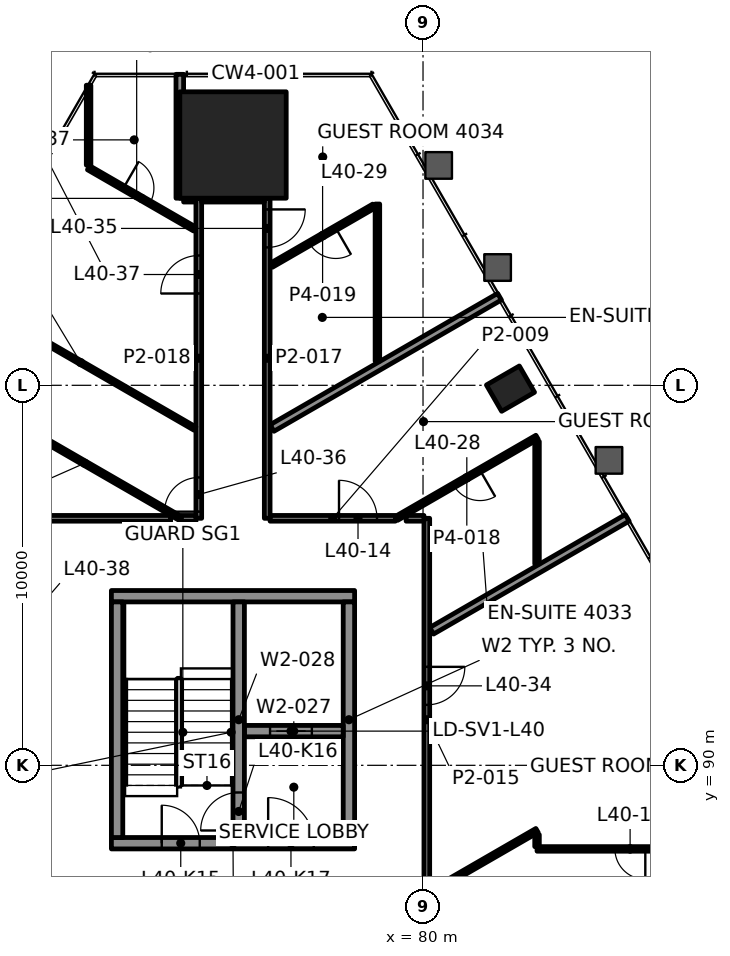
"""IFC4 building model, lengths in metres.
Left out: names, types, materials, properties, quantities, classifications, styles, units other than length and angle.
Written with IfcOpenShell. Run it as: python <this file> out.ifc"""

import sys

from ifc_helpers import new_model, si_unit, direction, frame, frame_2d, origin, origin_2d, place, context, subcontext, project, spatial, rectangle, hollow_rectangle, extrude, element, fill, save


model = new_model("IFC4")
c1 = context("Model", 3, precision=1e-05, world=origin(), true_north=direction((0.0, 1.0)))
c2 = subcontext(c1, "Body", "Model", "MODEL_VIEW")
j1 = project(units=[si_unit("LENGTHUNIT", "METRE"), si_unit("PLANEANGLEUNIT", "RADIAN")], contexts=[c1])
p1 = place(None, origin())
s1 = spatial("IfcSite", under=j1, at=p1, CompositionType="ELEMENT")
p2 = place(p1, origin())
s2 = spatial("IfcBuilding", under=s1, at=p2, CompositionType="ELEMENT")
p3 = place(p2, frame((0.0, 0.0, 175.3)))
s3 = spatial("IfcBuildingStorey", under=s2, at=p3, CompositionType="ELEMENT", Elevation=175.3)
p4 = place(p3, frame((75.0, 106.323, 0.0), z_axis=(0.0, 0.0, 1.0), x_axis=(-1.0, 0.0, 0.0)))
e1 = element("IfcColumn", 1, at=p4, inside=s3, PredefinedType="COLUMN", context=c2, shape_type="SweptSolid", body=[
    extrude(rectangle(XDim=2.8, YDim=2.8, at=origin_2d()), origin(), (0.0, 0.0, 1.0), 3.9),
])
p5 = place(p3, frame((82.302, 99.912, -0.0), z_axis=(0.0, 0.0, 1.0), x_axis=(-0.5, 0.866025403784, 0.0)))
e2 = element("IfcColumn", 2, at=p5, inside=s3, PredefinedType="COLUMN", context=c2, shape_type="SweptSolid", body=[
    extrude(hollow_rectangle(XDim=0.8, YDim=1.0, WallThickness=0.05, at=origin_2d()), origin(), (0.0, 0.0, 1.0), 3.9),
])
p6 = place(p3, frame((71.8, 87.95, 0.0), z_axis=(0.0, 0.0, 1.0), x_axis=(1.0, 0.0, 0.0)))
e3 = element("IfcWall", 3, at=p6, inside=s3, PredefinedType="SHEAR", context=c2, shape_type="SweptSolid", body=[
    extrude(rectangle(XDim=6.4, YDim=0.3, at=frame_2d((3.2, 0.0))), origin(), (0.0, 0.0, 1.0), 3.7),
])
p7 = place(p6, frame((1.325, 0.0, 0.0)))
e4 = element("IfcOpeningElement", 4, at=p7, cuts=e3, PredefinedType="OPENING", context=c2, shape_type="SweptSolid", body=[
    extrude(rectangle(XDim=1.0, YDim=2.1, at=frame_2d((0.5, 1.05))), frame((0.0, 0.16, 0.0), z_axis=(0.0, -1.0, 0.0), x_axis=(1.0, 0.0, 0.0)), (0.0, 0.0, 1.0), 0.32),
])
p8 = place(p6, frame((4.125, 0.0, 0.0)))
e5 = element("IfcOpeningElement", 5, at=p8, cuts=e3, PredefinedType="OPENING", context=c2, shape_type="SweptSolid", body=[
    extrude(rectangle(XDim=1.2, YDim=2.1, at=frame_2d((0.6, 1.05))), frame((0.0, 0.16, 0.0), z_axis=(0.0, -1.0, 0.0), x_axis=(1.0, 0.0, 0.0)), (0.0, 0.0, 1.0), 0.32),
])
p9 = place(p3, frame((71.8, 94.45, 0.0), z_axis=(0.0, 0.0, 1.0), x_axis=(1.0, 0.0, 0.0)))
e6 = element("IfcWall", 6, at=p9, inside=s3, PredefinedType="SHEAR", context=c2, shape_type="SweptSolid", body=[
    extrude(rectangle(XDim=6.4, YDim=0.3, at=frame_2d((3.2, 0.0))), origin(), (0.0, 0.0, 1.0), 3.7),
])
for number, where, z_axis, x_axis in (
    (7, (71.95, 88.1, 0.0), (0.0, 0.0, 1.0), (0.0, 1.0, 0.0)),
    (8, (78.05, 88.1, 0.0), (0.0, 0.0, 1.0), (0.0, 1.0, 0.0)),
):
    element("IfcWall", number, at=place(p3, frame(where, z_axis=z_axis, x_axis=x_axis)), inside=s3, PredefinedType="SHEAR", context=c2, shape_type="SweptSolid", body=[
        extrude(rectangle(XDim=6.2, YDim=0.3, at=frame_2d((3.1, 0.0))), origin(), (0.0, 0.0, 1.0), 3.7),
    ])
p10 = place(p3, frame((75.3, 90.9, 0.0), z_axis=(0.0, 0.0, 1.0), x_axis=(1.0, 0.0, 0.0)))
e9 = element("IfcWall", 9, at=p10, inside=s3, PredefinedType="SHEAR", context=c2, shape_type="SweptSolid", body=[
    extrude(rectangle(XDim=2.6, YDim=0.3, at=frame_2d((1.3, 0.0))), origin(), (0.0, 0.0, 1.0), 3.7),
])
p11 = place(p10, frame((0.675, 0.0, 0.0)))
e10 = element("IfcOpeningElement", 10, at=p11, cuts=e9, PredefinedType="OPENING", context=c2, shape_type="SweptSolid", body=[
    extrude(rectangle(XDim=1.1, YDim=2.1, at=frame_2d((0.55, 1.05))), frame((0.0, 0.16, 0.0), z_axis=(0.0, -1.0, 0.0), x_axis=(1.0, 0.0, 0.0)), (0.0, 0.0, 1.0), 0.32),
])
p12 = place(p3, frame((75.15, 88.1, 0.0), z_axis=(0.0, 0.0, 1.0), x_axis=(0.0, 1.0, 0.0)))
e11 = element("IfcWall", 11, at=p12, inside=s3, PredefinedType="SHEAR", context=c2, shape_type="SweptSolid", body=[
    extrude(rectangle(XDim=6.2, YDim=0.3, at=frame_2d((3.1, 0.0))), origin(), (0.0, 0.0, 1.0), 3.7),
])
p13 = place(p12, frame((0.185, 0.0, 0.0)))
e12 = element("IfcOpeningElement", 12, at=p13, cuts=e11, PredefinedType="OPENING", context=c2, shape_type="SweptSolid", body=[
    extrude(rectangle(XDim=1.0, YDim=2.1, at=frame_2d((0.5, 1.05))), frame((0.0, 0.16, 0.0), z_axis=(0.0, -1.0, 0.0), x_axis=(1.0, 0.0, 0.0)), (0.0, 0.0, 1.0), 0.32),
])
p14 = place(p3, frame((87.898, 87.8, 0.0), z_axis=(0.0, 0.0, 1.0), x_axis=(-1.0, 0.0, 0.0)))
e13 = element("IfcWall", 13, at=p14, inside=s3, PredefinedType="PARTITIONING", context=c2, shape_type="SweptSolid", body=[
    extrude(rectangle(XDim=4.898, YDim=0.12, at=frame_2d((2.449, 0.0))), origin(), (0.0, 0.0, 1.0), 3.1),
])
p15 = place(p14, frame((2.049, 0.0, 0.0)))
e14 = element("IfcOpeningElement", 14, at=p15, cuts=e13, PredefinedType="OPENING", context=c2, shape_type="SweptSolid", body=[
    extrude(rectangle(XDim=0.8, YDim=2.1, at=frame_2d((0.4, 1.05))), frame((0.0, 0.07, 0.0), z_axis=(0.0, -1.0, 0.0), x_axis=(1.0, 0.0, 0.0)), (0.0, 0.0, 1.0), 0.14),
])
p16 = place(p3, frame((69.975, 96.5, 0.0), z_axis=(0.0, 0.0, 1.0), x_axis=(1.0, 0.0, 0.0)))
e15 = element("IfcWall", 15, at=p16, inside=s3, PredefinedType="PARTITIONING", context=c2, shape_type="SweptSolid", body=[
    extrude(rectangle(XDim=3.384, YDim=0.15, at=frame_2d((1.692, 0.0))), origin(), (0.0, 0.0, 1.0), 3.1),
])
p17 = place(p3, frame((75.975, 96.5, 0.0), z_axis=(0.0, 0.0, 1.0), x_axis=(1.0, 0.0, 0.0)))
e16 = element("IfcWall", 16, at=p17, inside=s3, PredefinedType="PARTITIONING", context=c2, shape_type="SweptSolid", body=[
    extrude(rectangle(XDim=3.299, YDim=0.15, at=frame_2d((1.649, 0.0))), origin(), (0.0, 0.0, 1.0), 3.1),
])
p18 = place(p17, frame((1.814, 0.0, 0.0)))
e17 = element("IfcOpeningElement", 17, at=p18, cuts=e16, PredefinedType="OPENING", context=c2, shape_type="SweptSolid", body=[
    extrude(rectangle(XDim=1.0, YDim=2.1, at=frame_2d((0.5, 1.05))), frame((0.0, 0.085, 0.0), z_axis=(0.0, -1.0, 0.0), x_axis=(1.0, 0.0, 0.0)), (0.0, 0.0, 1.0), 0.17),
])
p19 = place(p3, frame((73.7, 104.923, 0.0), z_axis=(0.0, 0.0, 1.0), x_axis=(1.0, 0.0, 0.0)))
e18 = element("IfcWall", 18, at=p19, inside=s3, PredefinedType="PARTITIONING", context=c2, shape_type="SweptSolid", body=[
    extrude(rectangle(XDim=0.324, YDim=0.2, at=frame_2d((0.162, 0.0))), origin(), (0.0, 0.0, 1.0), 3.1),
])
p20 = place(p3, frame((83.471, 85.065, 0.0), z_axis=(0.0, 0.0, 1.0), x_axis=(0.866022862013, 0.500004402451, 0.0)))
e19 = element("IfcWall", 19, at=p20, inside=s3, PredefinedType="PARTITIONING", context=c2, shape_type="SweptSolid", body=[
    extrude(rectangle(XDim=7.371, YDim=0.2, at=frame_2d((3.685, 0.0))), origin(), (0.0, 0.0, 1.0), 3.022),
])
p21 = place(p3, frame((80.209, 86.675, 0.0), z_axis=(0.0, 0.0, 1.0), x_axis=(0.86604299788, 0.499969524894, 0.0)))
e20 = element("IfcWall", 20, at=p21, inside=s3, PredefinedType="PARTITIONING", context=c2, shape_type="SweptSolid", body=[
    extrude(rectangle(XDim=3.222, YDim=0.12, at=frame_2d((1.611, 0.0))), origin(), (0.0, 0.0, 1.0), 3.1),
])
p22 = place(p3, frame((80.227, 93.541, 0.0), z_axis=(0.0, 0.0, 1.0), x_axis=(0.86603507536, 0.499983247966, 0.0)))
e21 = element("IfcWall", 21, at=p22, inside=s3, PredefinedType="PARTITIONING", context=c2, shape_type="SweptSolid", body=[
    extrude(rectangle(XDim=5.943, YDim=0.2, at=frame_2d((2.971, 0.0))), origin(), (0.0, 0.0, 1.0), 3.022),
])
p23 = place(p3, frame((83.0, 98.634, 0.0), z_axis=(0.0, 0.0, 1.0), x_axis=(-0.866013160285, -0.500021205763, 0.0)))
e22 = element("IfcWall", 22, at=p23, inside=s3, PredefinedType="PARTITIONING", context=c2, shape_type="SweptSolid", body=[
    extrude(rectangle(XDim=4.268, YDim=0.12, at=frame_2d((2.134, 0.0))), origin(), (0.0, 0.0, 1.0), 3.022),
])
p24 = place(p23, frame((1.734, 0.0, 0.0)))
e23 = element("IfcOpeningElement", 23, at=p24, cuts=e22, PredefinedType="OPENING", context=c2, shape_type="SweptSolid", body=[
    extrude(rectangle(XDim=0.8, YDim=2.1, at=frame_2d((0.4, 1.05))), frame((0.0, 0.07, 0.0), z_axis=(0.0, -1.0, 0.0), x_axis=(1.0, 0.0, 0.0)), (0.0, 0.0, 1.0), 0.14),
])
p25 = place(p3, frame((76.027, 98.876, 0.0), z_axis=(0.0, 0.0, 1.0), x_axis=(0.866023821458, 0.500002740659, 0.0)))
e24 = element("IfcWall", 24, at=p25, inside=s3, PredefinedType="PARTITIONING", context=c2, shape_type="SweptSolid", body=[
    extrude(rectangle(XDim=6.912, YDim=0.2, at=frame_2d((3.456, 0.0))), origin(), (0.0, 0.0, 1.0), 3.1),
])
p26 = place(p3, frame((78.705, 104.716, 0.0), z_axis=(0.0, 0.0, 1.0), x_axis=(-0.866028856698, -0.499994019331, 0.0)))
e25 = element("IfcWall", 25, at=p26, inside=s3, PredefinedType="PARTITIONING", context=c2, shape_type="SweptSolid", body=[
    extrude(rectangle(XDim=3.113, YDim=0.12, at=frame_2d((1.556, 0.0))), origin(), (0.0, 0.0, 1.0), 3.1),
])
p27 = place(p26, frame((1.156, 0.0, 0.0)))
e26 = element("IfcOpeningElement", 26, at=p27, cuts=e25, PredefinedType="OPENING", context=c2, shape_type="SweptSolid", body=[
    extrude(rectangle(XDim=0.8, YDim=2.1, at=frame_2d((0.4, 1.05))), frame((0.0, 0.07, 0.0), z_axis=(0.0, -1.0, 0.0), x_axis=(1.0, 0.0, 0.0)), (0.0, 0.0, 1.0), 0.14),
])
p28 = place(p3, frame((83.0, 87.86, 0.0), z_axis=(0.0, 0.0, 1.0), x_axis=(0.0, 1.0, 0.0)))
e27 = element("IfcWall", 27, at=p28, inside=s3, PredefinedType="PARTITIONING", context=c2, shape_type="SweptSolid", body=[
    extrude(rectangle(XDim=0.316, YDim=0.12, at=frame_2d((0.158, 0.0))), origin(), (0.0, 0.0, 1.0), 3.1),
])
p29 = place(p3, frame((83.0, 95.297, 0.0), z_axis=(0.0, 0.0, 1.0), x_axis=(0.0, 1.0, 0.0)))
e28 = element("IfcWall", 28, at=p29, inside=s3, PredefinedType="PARTITIONING", context=c2, shape_type="SweptSolid", body=[
    extrude(rectangle(XDim=3.228, YDim=0.12, at=frame_2d((1.614, 0.0))), origin(), (0.0, 0.0, 1.0), 3.022),
])
p30 = place(p3, frame((80.1, 96.5, 0.0), z_axis=(0.0, 0.0, 1.0), x_axis=(0.0, -1.0, 0.0)))
e29 = element("IfcWall", 29, at=p30, inside=s3, PredefinedType="PARTITIONING", context=c2, shape_type="SweptSolid", body=[
    extrude(rectangle(XDim=10.6, YDim=0.15, at=frame_2d((5.3, 0.0))), origin(), (0.0, 0.0, 1.0), 3.022),
])
p31 = place(p30, frame((3.909, 0.0, 0.0)))
e30 = element("IfcOpeningElement", 30, at=p31, cuts=e29, PredefinedType="OPENING", context=c2, shape_type="SweptSolid", body=[
    extrude(rectangle(XDim=1.0, YDim=2.1, at=frame_2d((0.5, 1.05))), frame((0.0, 0.085, 0.0), z_axis=(0.0, -1.0, 0.0), x_axis=(1.0, 0.0, 0.0)), (0.0, 0.0, 1.0), 0.17),
])
p32 = place(p3, frame((78.8, 100.633, 0.0), z_axis=(0.0, 0.0, 1.0), x_axis=(0.0, 1.0, 0.0)))
e31 = element("IfcWall", 31, at=p32, inside=s3, PredefinedType="PARTITIONING", context=c2, shape_type="SweptSolid", body=[
    extrude(rectangle(XDim=4.137, YDim=0.12, at=frame_2d((2.069, 0.0))), origin(), (0.0, 0.0, 1.0), 3.1),
])
p33 = place(p3, frame((75.9, 104.923, 0.0), z_axis=(0.0, 0.0, 1.0), x_axis=(0.0, -1.0, 0.0)))
e32 = element("IfcWall", 32, at=p33, inside=s3, PredefinedType="PARTITIONING", context=c2, shape_type="SweptSolid", body=[
    extrude(rectangle(XDim=8.423, YDim=0.15, at=frame_2d((4.211, 0.0))), origin(), (0.0, 0.0, 1.0), 3.1),
])
p34 = place(p33, frame((0.294, 0.0, 0.0)))
e33 = element("IfcOpeningElement", 33, at=p34, cuts=e32, PredefinedType="OPENING", context=c2, shape_type="SweptSolid", body=[
    extrude(rectangle(XDim=1.0, YDim=2.1, at=frame_2d((0.5, 1.05))), frame((0.0, 0.085, 0.0), z_axis=(0.0, -1.0, 0.0), x_axis=(1.0, 0.0, 0.0)), (0.0, 0.0, 1.0), 0.17),
])
p35 = place(p3, frame((74.1, 96.5, 0.0), z_axis=(0.0, 0.0, 1.0), x_axis=(0.0, 1.0, 0.0)))
e34 = element("IfcWall", 34, at=p35, inside=s3, PredefinedType="PARTITIONING", context=c2, shape_type="SweptSolid", body=[
    extrude(rectangle(XDim=8.424, YDim=0.15, at=frame_2d((4.212, 0.0))), origin(), (0.0, 0.0, 1.0), 3.1),
])
p36 = place(p35, frame((0.175, 0.0, 0.0)))
e35 = element("IfcOpeningElement", 35, at=p36, cuts=e34, PredefinedType="OPENING", context=c2, shape_type="SweptSolid", body=[
    extrude(rectangle(XDim=0.9, YDim=2.1, at=frame_2d((0.45, 1.05))), frame((0.0, 0.085, 0.0), z_axis=(0.0, -1.0, 0.0), x_axis=(1.0, 0.0, 0.0)), (0.0, 0.0, 1.0), 0.17),
])
p37 = place(p35, frame((5.916, 0.0, 0.0)))
e36 = element("IfcOpeningElement", 36, at=p37, cuts=e34, PredefinedType="OPENING", context=c2, shape_type="SweptSolid", body=[
    extrude(rectangle(XDim=1.0, YDim=2.1, at=frame_2d((0.5, 1.05))), frame((0.0, 0.085, 0.0), z_axis=(0.0, -1.0, 0.0), x_axis=(1.0, 0.0, 0.0)), (0.0, 0.0, 1.0), 0.17),
])
p38 = place(p3, frame((73.6, 104.924, 0.0), z_axis=(0.0, 0.0, 1.0), x_axis=(0.0, 1.0, 0.0)))
e37 = element("IfcWall", 37, at=p38, inside=s3, PredefinedType="PARTITIONING", context=c2, shape_type="SweptSolid", body=[
    extrude(rectangle(XDim=3.26, YDim=0.2, at=frame_2d((1.63, 0.0))), origin(), (0.0, 0.0, 1.0), 3.1),
])
p39 = place(p3, frame((71.2, 105.794, 0.0), z_axis=(0.0, 0.0, 1.0), x_axis=(0.0, 1.0, 0.0)))
e38 = element("IfcWall", 38, at=p39, inside=s3, PredefinedType="PARTITIONING", context=c2, shape_type="SweptSolid", body=[
    extrude(rectangle(XDim=2.103, YDim=0.12, at=frame_2d((1.052, 0.0))), origin(), (0.0, 0.0, 1.0), 3.1),
])
p40 = place(p3, frame((71.2, 105.724, 0.0), z_axis=(0.0, 0.0, 1.0), x_axis=(0.86604299788, -0.499969524894, 0.0)))
e39 = element("IfcWall", 39, at=p40, inside=s3, PredefinedType="PARTITIONING", context=c2, shape_type="SweptSolid", body=[
    extrude(rectangle(XDim=3.222, YDim=0.12, at=frame_2d((1.611, 0.0))), origin(), (0.0, 0.0, 1.0), 3.1),
])
p41 = place(p40, frame((1.061, 0.0, 0.0)))
e40 = element("IfcOpeningElement", 40, at=p41, cuts=e39, PredefinedType="OPENING", context=c2, shape_type="SweptSolid", body=[
    extrude(rectangle(XDim=0.8, YDim=2.1, at=frame_2d((0.4, 1.05))), frame((0.0, 0.07, 0.0), z_axis=(0.0, -1.0, 0.0), x_axis=(1.0, 0.0, 0.0)), (0.0, 0.0, 1.0), 0.14),
])
p42 = place(p3, frame((73.999, 98.862, 0.0), z_axis=(0.0, 0.0, 1.0), x_axis=(-0.866026860931, 0.49999747614, 0.0)))
e41 = element("IfcWall", 41, at=p42, inside=s3, PredefinedType="PARTITIONING", context=c2, shape_type="SweptSolid", body=[
    extrude(rectangle(XDim=6.941, YDim=0.1, at=frame_2d((3.471, 0.0))), origin(), (0.0, 0.0, 1.0), 3.1),
])
p43 = place(p3, frame((73.609, 96.5, 0.0), z_axis=(0.0, 0.0, 1.0), x_axis=(-0.866032775405, 0.499987231761, 0.0)))
e42 = element("IfcWall", 42, at=p43, inside=s3, PredefinedType="PARTITIONING", context=c2, shape_type="SweptSolid", body=[
    extrude(rectangle(XDim=5.8, YDim=0.12, at=frame_2d((2.9, 0.0))), origin(), (0.0, 0.0, 1.0), 3.1),
])
p44 = place(p3, frame((71.01, 85.065, 0.0), z_axis=(0.0, 0.0, 1.0), x_axis=(-0.866024161028, 0.500002152512, 0.0)))
e43 = element("IfcWall", 43, at=p44, inside=s3, PredefinedType="PARTITIONING", context=c2, shape_type="SweptSolid", body=[
    extrude(rectangle(XDim=6.07, YDim=0.2, at=frame_2d((3.035, 0.0))), origin(), (0.0, 0.0, 1.0), 3.1),
])
p45 = place(p3, frame((73.639, 96.5, 0.0), z_axis=(0.0, 0.0, 1.0), x_axis=(1.0, 0.0, 0.0)))
e44 = element("IfcWall", 44, at=p45, inside=s3, PredefinedType="PARTITIONING", context=c2, shape_type="SweptSolid", body=[
    extrude(rectangle(XDim=0.386, YDim=0.15, at=frame_2d((0.193, 0.0))), origin(), (0.0, 0.0, 1.0), 3.1),
])
p46 = place(p3, frame((79.555, 96.5, 0.0), z_axis=(0.0, 0.0, 1.0), x_axis=(1.0, 0.0, 0.0)))
e45 = element("IfcWall", 45, at=p46, inside=s3, PredefinedType="PARTITIONING", context=c2, shape_type="SweptSolid", body=[
    extrude(rectangle(XDim=0.47, YDim=0.15, at=frame_2d((0.235, 0.0))), origin(), (0.0, 0.0, 1.0), 3.1),
])
p47 = place(p3, frame((74.175, 104.923, 0.0), z_axis=(0.0, 0.0, 1.0), x_axis=(1.0, 0.0, 0.0)))
e46 = element("IfcWall", 46, at=p47, inside=s3, PredefinedType="PARTITIONING", context=c2, shape_type="SweptSolid", body=[
    extrude(rectangle(XDim=1.649, YDim=0.2, at=frame_2d((0.825, 0.0))), origin(), (0.0, 0.0, 1.0), 3.097),
])
p48 = place(p15, origin())
e47 = element("IfcDoor", 47, at=p48, inside=s3, OperationType="SINGLE_SWING_LEFT", PredefinedType="DOOR", context=c2, shape_type="SweptSolid", body=[
    extrude(rectangle(XDim=0.8, YDim=2.1, at=frame_2d((0.4, 1.05))), frame((0.0, 0.025, 0.0), z_axis=(0.0, -1.0, 0.0), x_axis=(1.0, 0.0, 0.0)), (0.0, 0.0, 1.0), 0.05),
])
fill(e14, e47)
p49 = place(p18, origin())
e48 = element("IfcDoor", 48, at=p49, inside=s3, OperationType="SINGLE_SWING_LEFT", PredefinedType="DOOR", context=c2, shape_type="SweptSolid", body=[
    extrude(rectangle(XDim=1.0, YDim=2.1, at=frame_2d((0.5, 1.05))), frame((0.0, 0.025, 0.0), z_axis=(0.0, -1.0, 0.0), x_axis=(1.0, 0.0, 0.0)), (0.0, 0.0, 1.0), 0.05),
])
fill(e17, e48)
p50 = place(p24, origin())
e49 = element("IfcDoor", 49, at=p50, inside=s3, OperationType="SINGLE_SWING_LEFT", PredefinedType="DOOR", context=c2, shape_type="SweptSolid", body=[
    extrude(rectangle(XDim=0.8, YDim=2.1, at=frame_2d((0.4, 1.05))), frame((0.0, 0.025, 0.0), z_axis=(0.0, -1.0, 0.0), x_axis=(1.0, 0.0, 0.0)), (0.0, 0.0, 1.0), 0.05),
])
fill(e23, e49)
p51 = place(p27, origin())
e50 = element("IfcDoor", 50, at=p51, inside=s3, OperationType="SINGLE_SWING_LEFT", PredefinedType="DOOR", context=c2, shape_type="SweptSolid", body=[
    extrude(rectangle(XDim=0.8, YDim=2.1, at=frame_2d((0.4, 1.05))), frame((0.0, 0.025, 0.0), z_axis=(0.0, -1.0, 0.0), x_axis=(1.0, 0.0, 0.0)), (0.0, 0.0, 1.0), 0.05),
])
fill(e26, e50)
p52 = place(p31, origin())
e51 = element("IfcDoor", 51, at=p52, inside=s3, OperationType="SINGLE_SWING_RIGHT", PredefinedType="DOOR", context=c2, shape_type="SweptSolid", body=[
    extrude(rectangle(XDim=1.0, YDim=2.1, at=frame_2d((0.5, 1.05))), frame((0.0, 0.025, 0.0), z_axis=(0.0, -1.0, 0.0), x_axis=(1.0, 0.0, 0.0)), (0.0, 0.0, 1.0), 0.05),
])
fill(e30, e51)
p53 = place(p34, origin())
e52 = element("IfcDoor", 52, at=p53, inside=s3, OperationType="SINGLE_SWING_RIGHT", PredefinedType="DOOR", context=c2, shape_type="SweptSolid", body=[
    extrude(rectangle(XDim=1.0, YDim=2.1, at=frame_2d((0.5, 1.05))), frame((0.0, 0.025, 0.0), z_axis=(0.0, -1.0, 0.0), x_axis=(1.0, 0.0, 0.0)), (0.0, 0.0, 1.0), 0.05),
])
fill(e33, e52)
p54 = place(p36, origin())
e53 = element("IfcDoor", 53, at=p54, inside=s3, OperationType="SINGLE_SWING_LEFT", PredefinedType="DOOR", context=c2, shape_type="SweptSolid", body=[
    extrude(rectangle(XDim=0.9, YDim=2.1, at=frame_2d((0.45, 1.05))), frame((0.0, 0.025, 0.0), z_axis=(0.0, -1.0, 0.0), x_axis=(1.0, 0.0, 0.0)), (0.0, 0.0, 1.0), 0.05),
])
fill(e35, e53)
p55 = place(p37, origin())
e54 = element("IfcDoor", 54, at=p55, inside=s3, OperationType="SINGLE_SWING_LEFT", PredefinedType="DOOR", context=c2, shape_type="SweptSolid", body=[
    extrude(rectangle(XDim=1.0, YDim=2.1, at=frame_2d((0.5, 1.05))), frame((0.0, 0.025, 0.0), z_axis=(0.0, -1.0, 0.0), x_axis=(1.0, 0.0, 0.0)), (0.0, 0.0, 1.0), 0.05),
])
fill(e36, e54)
p56 = place(p41, origin())
e55 = element("IfcDoor", 55, at=p56, inside=s3, OperationType="SINGLE_SWING_LEFT", PredefinedType="DOOR", context=c2, shape_type="SweptSolid", body=[
    extrude(rectangle(XDim=0.8, YDim=2.1, at=frame_2d((0.4, 1.05))), frame((0.0, 0.025, 0.0), z_axis=(0.0, -1.0, 0.0), x_axis=(1.0, 0.0, 0.0)), (0.0, 0.0, 1.0), 0.05),
])
fill(e40, e55)
p57 = place(p11, origin())
e56 = element("IfcDoor", 56, at=p57, inside=s3, OperationType="DOUBLE_DOOR_SLIDING", PredefinedType="DOOR", context=c2, shape_type="SweptSolid", body=[
    extrude(rectangle(XDim=1.1, YDim=2.1, at=frame_2d((0.55, 1.05))), frame((0.0, 0.025, 0.0), z_axis=(0.0, -1.0, 0.0), x_axis=(1.0, 0.0, 0.0)), (0.0, 0.0, 1.0), 0.05),
])
fill(e10, e56)
p58 = place(p7, origin())
e57 = element("IfcDoor", 57, at=p58, inside=s3, OperationType="SINGLE_SWING_RIGHT", PredefinedType="DOOR", context=c2, shape_type="SweptSolid", body=[
    extrude(rectangle(XDim=1.0, YDim=2.1, at=frame_2d((0.5, 1.05))), frame((0.0, 0.025, 0.0), z_axis=(0.0, -1.0, 0.0), x_axis=(1.0, 0.0, 0.0)), (0.0, 0.0, 1.0), 0.05),
])
fill(e4, e57)
p59 = place(p13, origin())
e58 = element("IfcDoor", 58, at=p59, inside=s3, OperationType="SINGLE_SWING_LEFT", PredefinedType="DOOR", context=c2, shape_type="SweptSolid", body=[
    extrude(rectangle(XDim=1.0, YDim=2.1, at=frame_2d((0.5, 1.05))), frame((0.0, 0.025, 0.0), z_axis=(0.0, -1.0, 0.0), x_axis=(1.0, 0.0, 0.0)), (0.0, 0.0, 1.0), 0.05),
])
fill(e12, e58)
p60 = place(p8, origin())
e59 = element("IfcDoor", 59, at=p60, inside=s3, OperationType="SINGLE_SWING_RIGHT", PredefinedType="DOOR", context=c2, shape_type="SweptSolid", body=[
    extrude(rectangle(XDim=1.2, YDim=2.1, at=frame_2d((0.6, 1.05))), frame((0.0, 0.025, 0.0), z_axis=(0.0, -1.0, 0.0), x_axis=(1.0, 0.0, 0.0)), (0.0, 0.0, 1.0), 0.05),
])
fill(e5, e59)
save(model, sys.argv[1])
